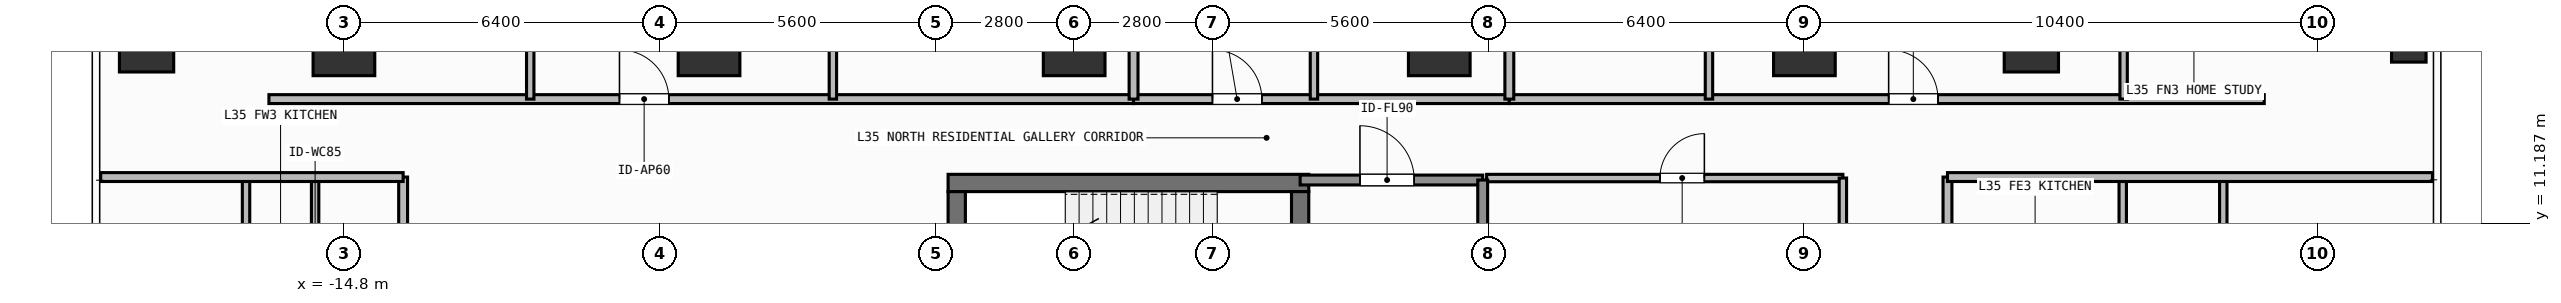
"""IFC4 building model, lengths in metres.
Left out: names, types, materials, properties, quantities, classifications, styles, units other than length and angle.
Written with IfcOpenShell. Run it as: python <this file> out.ifc"""

import sys

from ifc_helpers import new_model, si_unit, direction, frame, frame_2d, origin, origin_2d, place, context, subcontext, project, spatial, rectangle, hollow_rectangle, extrude, element, fill, save


model = new_model("IFC4")
c1 = context("Model", 3, precision=1e-05, world=origin(), true_north=direction((0.0, 1.0)))
c2 = subcontext(c1, "Body", "Model", "MODEL_VIEW")
j1 = project(units=[si_unit("LENGTHUNIT", "METRE"), si_unit("PLANEANGLEUNIT", "RADIAN")], contexts=[c1])
p1 = place(None, origin())
s1 = spatial("IfcSite", under=j1, at=p1, CompositionType="ELEMENT")
p2 = place(p1, origin())
s2 = spatial("IfcBuilding", under=s1, at=p2, CompositionType="ELEMENT")
p3 = place(p2, frame((0.0, 0.0, 140.7)))
s3 = spatial("IfcBuildingStorey", under=s2, at=p3, CompositionType="ELEMENT", Elevation=140.7)
p4 = place(p3, frame((-2.555, 12.0, 0.0), z_axis=(0.0, 0.0, 1.0), x_axis=(1.0, 0.0, 0.0)))
e1 = element("IfcWall", 1, at=p4, inside=s3, PredefinedType="SHEAR", context=c2, shape_type="SweptSolid", body=[
    extrude(rectangle(XDim=7.31, YDim=0.35, at=frame_2d((3.655, 0.0))), origin(), (0.0, 0.0, 1.0), 3.9),
])
p5 = place(p3, frame((-2.38, 8.9, 0.0), z_axis=(0.0, 0.0, 1.0), x_axis=(0.0, 1.0, 0.0)))
e2 = element("IfcWall", 2, at=p5, inside=s3, PredefinedType="SHEAR", context=c2, shape_type="SweptSolid", body=[
    extrude(rectangle(XDim=2.925, YDim=0.35, at=frame_2d((1.462, 0.0))), origin(), (0.0, 0.0, 1.0), 3.9),
])
p6 = place(p3, frame((4.58, 11.825, 0.0), z_axis=(0.0, 0.0, 1.0), x_axis=(0.0, -1.0, 0.0)))
e3 = element("IfcWall", 3, at=p6, inside=s3, PredefinedType="SHEAR", context=c2, shape_type="SweptSolid", body=[
    extrude(rectangle(XDim=2.925, YDim=0.35, at=frame_2d((1.462, 0.0))), origin(), (0.0, 0.0, 1.0), 3.9),
])
p7 = place(p6, frame((0.913, 0.0, 0.0)))
e4 = element("IfcOpeningElement", 4, at=p7, cuts=e3, PredefinedType="OPENING", context=c2, shape_type="SweptSolid", body=[
    extrude(rectangle(XDim=1.1, YDim=2.15, at=frame_2d((0.55, 1.075))), frame((0.0, 0.185, 0.0), z_axis=(0.0, -1.0, 0.0), x_axis=(1.0, 0.0, 0.0)), (0.0, 0.0, 1.0), 0.37),
])
for number, where, z_axis, x_axis in (
    (5, (-14.8, 14.8, 0.0), (0.0, 0.0, 1.0), (1.0, 0.0, 0.0)),
    (6, (-7.4, 14.8, 0.0), (0.0, 0.0, 1.0), (1.0, 0.0, 0.0)),
    (7, (0.0, 14.8, 0.0), (0.0, 0.0, 1.0), (1.0, 0.0, 0.0)),
    (8, (7.4, 14.8, 0.0), (0.0, 0.0, 1.0), (1.0, 0.0, 0.0)),
    (9, (14.8, 14.8, 0.0), (0.0, 0.0, 1.0), (1.0, 0.0, 0.0)),
):
    element("IfcColumn", number, at=place(p3, frame(where, z_axis=z_axis, x_axis=x_axis)), inside=s3, PredefinedType="COLUMN", context=c2, shape_type="SweptSolid", body=[
        extrude(rectangle(XDim=1.25, YDim=1.25, at=origin_2d()), origin(), (0.0, 0.0, 1.0), 3.9),
    ])
for number, where, z_axis, x_axis in (
    (10, (-18.8, 14.8, 0.0), (0.0, 0.0, 1.0), (1.0, 0.0, 0.0)),
    (11, (19.4, 14.8, 0.0), (0.0, 0.0, 1.0), (1.0, 0.0, 0.0)),
):
    element("IfcColumn", number, at=place(p3, frame(where, z_axis=z_axis, x_axis=x_axis)), inside=s3, PredefinedType="COLUMN", context=c2, shape_type="SweptSolid", body=[
        extrude(rectangle(XDim=1.1, YDim=1.1, at=origin_2d()), origin(), (0.0, 0.0, 1.0), 3.9),
    ])
p8 = place(p3, frame((27.05, 14.8, 0.0), z_axis=(0.0, 0.0, 1.0), x_axis=(1.0, 0.0, 0.0)))
e12 = element("IfcColumn", 12, at=p8, inside=s3, PredefinedType="COLUMN", context=c2, shape_type="SweptSolid", body=[
    extrude(hollow_rectangle(XDim=0.7, YDim=0.7, WallThickness=0.032, at=origin_2d()), origin(), (0.0, 0.0, 1.0), 3.9),
])
p9 = place(p3, frame((4.58, 12.06, 0.0), z_axis=(0.0, 0.0, 1.0), x_axis=(1.0, 0.0, 0.0)))
e13 = element("IfcWall", 13, at=p9, inside=s3, PredefinedType="SOLIDWALL", context=c2, shape_type="SweptSolid", body=[
    extrude(rectangle(XDim=3.7, YDim=0.2, at=frame_2d((1.85, 0.0))), origin(), (0.0, 0.0, 1.0), 3.68),
])
p10 = place(p9, frame((1.212, 0.0, 0.0)))
e14 = element("IfcOpeningElement", 14, at=p10, cuts=e13, PredefinedType="OPENING", context=c2, shape_type="SweptSolid", body=[
    extrude(rectangle(XDim=1.1, YDim=2.15, at=frame_2d((0.55, 1.075))), frame((0.0, 0.11, 0.0), z_axis=(0.0, -1.0, 0.0), x_axis=(1.0, 0.0, 0.0)), (0.0, 0.0, 1.0), 0.22),
])
p11 = place(p3, frame((8.36, 12.1, 0.0), z_axis=(0.0, 0.0, 1.0), x_axis=(1.0, 0.0, 0.0)))
e15 = element("IfcWall", 15, at=p11, inside=s3, PredefinedType="PARTITIONING", context=c2, shape_type="SweptSolid", body=[
    extrude(rectangle(XDim=7.22, YDim=0.15, at=frame_2d((3.61, 0.0))), origin(), (0.0, 0.0, 1.0), 3.68),
])
p12 = place(p11, frame((3.513, 0.0, 0.0)))
e16 = element("IfcOpeningElement", 16, at=p12, cuts=e15, PredefinedType="OPENING", context=c2, shape_type="SweptSolid", body=[
    extrude(rectangle(XDim=0.9, YDim=2.1, at=frame_2d((0.45, 1.05))), frame((0.0, 0.085, 0.0), z_axis=(0.0, -1.0, 0.0), x_axis=(1.0, 0.0, 0.0)), (0.0, 0.0, 1.0), 0.17),
])
p13 = place(p3, frame((-16.32, 13.7, 0.0), z_axis=(0.0, 0.0, 1.0), x_axis=(1.0, 0.0, 0.0)))
e17 = element("IfcWall", 17, at=p13, inside=s3, PredefinedType="PARTITIONING", context=c2, shape_type="SweptSolid", body=[
    extrude(rectangle(XDim=17.524, YDim=0.18, at=frame_2d((8.762, 0.0))), origin(), (0.0, 0.0, 1.0), 3.68),
])
p14 = place(p13, frame((7.104, 0.0, 0.0)))
e18 = element("IfcOpeningElement", 18, at=p14, cuts=e17, PredefinedType="OPENING", context=c2, shape_type="SweptSolid", body=[
    extrude(rectangle(XDim=1.0, YDim=2.2, at=frame_2d((0.5, 1.1))), frame((0.0, 0.1, 0.0), z_axis=(0.0, -1.0, 0.0), x_axis=(1.0, 0.0, 0.0)), (0.0, 0.0, 1.0), 0.2),
])
p15 = place(p3, frame((-11.024, 13.7, 0.0), z_axis=(0.0, 0.0, 1.0), x_axis=(0.0, 1.0, 0.0)))
e19 = element("IfcWall", 19, at=p15, inside=s3, PredefinedType="PARTITIONING", context=c2, shape_type="SweptSolid", body=[
    extrude(rectangle(XDim=5.69, YDim=0.15, at=frame_2d((2.845, 0.0))), origin(), (0.0, 0.0, 1.0), 3.68),
])
p16 = place(p15, frame((2.42, 0.0, 0.0)))
e20 = element("IfcOpeningElement", 20, at=p16, cuts=e19, PredefinedType="OPENING", context=c2, shape_type="SweptSolid", body=[
    extrude(rectangle(XDim=0.85, YDim=2.1, at=frame_2d((0.425, 1.05))), frame((0.0, 0.085, 0.0), z_axis=(0.0, -1.0, 0.0), x_axis=(1.0, 0.0, 0.0)), (0.0, 0.0, 1.0), 0.17),
])
p17 = place(p3, frame((-4.89, 13.7, 0.0), z_axis=(0.0, 0.0, 1.0), x_axis=(0.0, 1.0, 0.0)))
e21 = element("IfcWall", 21, at=p17, inside=s3, PredefinedType="PARTITIONING", context=c2, shape_type="SweptSolid", body=[
    extrude(rectangle(XDim=3.983, YDim=0.15, at=frame_2d((1.992, 0.0))), origin(), (0.0, 0.0, 1.0), 3.68),
])
p18 = place(p17, frame((1.566, 0.0, 0.0)))
e22 = element("IfcOpeningElement", 22, at=p18, cuts=e21, PredefinedType="OPENING", context=c2, shape_type="SweptSolid", body=[
    extrude(rectangle(XDim=0.85, YDim=2.1, at=frame_2d((0.425, 1.05))), frame((0.0, 0.085, 0.0), z_axis=(0.0, -1.0, 0.0), x_axis=(1.0, 0.0, 0.0)), (0.0, 0.0, 1.0), 0.17),
])
p19 = place(p3, frame((1.204, 13.7, 0.0), z_axis=(0.0, 0.0, 1.0), x_axis=(1.0, 0.0, 0.0)))
e23 = element("IfcWall", 23, at=p19, inside=s3, PredefinedType="PARTITIONING", context=c2, shape_type="SweptSolid", body=[
    extrude(rectangle(XDim=7.616, YDim=0.18, at=frame_2d((3.808, 0.0))), origin(), (0.0, 0.0, 1.0), 3.68),
])
p20 = place(p19, frame((1.599, 0.0, 0.0)))
e24 = element("IfcOpeningElement", 24, at=p20, cuts=e23, PredefinedType="OPENING", context=c2, shape_type="SweptSolid", body=[
    extrude(rectangle(XDim=1.0, YDim=2.2, at=frame_2d((0.5, 1.1))), frame((0.0, 0.1, 0.0), z_axis=(0.0, -1.0, 0.0), x_axis=(1.0, 0.0, 0.0)), (0.0, 0.0, 1.0), 0.2),
])
p21 = place(p3, frame((4.86, 13.7, 0.0), z_axis=(0.0, 0.0, 1.0), x_axis=(0.0, 1.0, 0.0)))
e25 = element("IfcWall", 25, at=p21, inside=s3, PredefinedType="PARTITIONING", context=c2, shape_type="SweptSolid", body=[
    extrude(rectangle(XDim=3.129, YDim=0.15, at=frame_2d((1.564, 0.0))), origin(), (0.0, 0.0, 1.0), 3.68),
])
p22 = place(p21, frame((1.229, 0.0, 0.0)))
e26 = element("IfcOpeningElement", 26, at=p22, cuts=e25, PredefinedType="OPENING", context=c2, shape_type="SweptSolid", body=[
    extrude(rectangle(XDim=0.85, YDim=2.1, at=frame_2d((0.425, 1.05))), frame((0.0, 0.085, 0.0), z_axis=(0.0, -1.0, 0.0), x_axis=(1.0, 0.0, 0.0)), (0.0, 0.0, 1.0), 0.17),
])
p23 = place(p3, frame((8.82, 13.7, 0.0), z_axis=(0.0, 0.0, 1.0), x_axis=(1.0, 0.0, 0.0)))
e27 = element("IfcWall", 27, at=p23, inside=s3, PredefinedType="PARTITIONING", context=c2, shape_type="SweptSolid", body=[
    extrude(rectangle(XDim=15.3, YDim=0.18, at=frame_2d((7.65, 0.0))), origin(), (0.0, 0.0, 1.0), 3.68),
])
p24 = place(p23, frame((7.688, 0.0, 0.0)))
e28 = element("IfcOpeningElement", 28, at=p24, cuts=e27, PredefinedType="OPENING", context=c2, shape_type="SweptSolid", body=[
    extrude(rectangle(XDim=1.0, YDim=2.2, at=frame_2d((0.5, 1.1))), frame((0.0, 0.1, 0.0), z_axis=(0.0, -1.0, 0.0), x_axis=(1.0, 0.0, 0.0)), (0.0, 0.0, 1.0), 0.2),
])
p25 = place(p3, frame((12.866, 13.7, 0.0), z_axis=(0.0, 0.0, 1.0), x_axis=(0.0, 1.0, 0.0)))
e29 = element("IfcWall", 29, at=p25, inside=s3, PredefinedType="PARTITIONING", context=c2, shape_type="SweptSolid", body=[
    extrude(rectangle(XDim=5.755, YDim=0.15, at=frame_2d((2.877, 0.0))), origin(), (0.0, 0.0, 1.0), 3.68),
])
p26 = place(p25, frame((2.452, 0.0, 0.0)))
e30 = element("IfcOpeningElement", 30, at=p26, cuts=e29, PredefinedType="OPENING", context=c2, shape_type="SweptSolid", body=[
    extrude(rectangle(XDim=0.85, YDim=2.1, at=frame_2d((0.425, 1.05))), frame((0.0, 0.085, 0.0), z_axis=(0.0, -1.0, 0.0), x_axis=(1.0, 0.0, 0.0)), (0.0, 0.0, 1.0), 0.17),
])
p27 = place(p3, frame((21.27, 13.7, 0.0), z_axis=(0.0, 0.0, 1.0), x_axis=(0.0, 1.0, 0.0)))
e31 = element("IfcWall", 31, at=p27, inside=s3, PredefinedType="PARTITIONING", context=c2, shape_type="SweptSolid", body=[
    extrude(rectangle(XDim=3.223, YDim=0.15, at=frame_2d((1.612, 0.0))), origin(), (0.0, 0.0, 1.0), 3.68),
])
p28 = place(p27, frame((1.7, 0.0, 0.0)))
e32 = element("IfcOpeningElement", 32, at=p28, cuts=e31, PredefinedType="OPENING", context=c2, shape_type="SweptSolid", body=[
    extrude(rectangle(XDim=0.85, YDim=2.1, at=frame_2d((0.425, 1.05))), frame((0.0, 0.085, 0.0), z_axis=(0.0, -1.0, 0.0), x_axis=(1.0, 0.0, 0.0)), (0.0, 0.0, 1.0), 0.17),
])
p29 = place(p3, frame((-13.6, 4.04, 0.0), z_axis=(0.0, 0.0, 1.0), x_axis=(0.0, 1.0, 0.0)))
e33 = element("IfcWall", 33, at=p29, inside=s3, PredefinedType="PARTITIONING", context=c2, shape_type="SweptSolid", body=[
    extrude(rectangle(XDim=8.08, YDim=0.18, at=frame_2d((4.04, 0.0))), origin(), (0.0, 0.0, 1.0), 3.68),
])
p30 = place(p29, frame((1.583, 0.0, 0.0)))
e34 = element("IfcOpeningElement", 34, at=p30, cuts=e33, PredefinedType="OPENING", context=c2, shape_type="SweptSolid", body=[
    extrude(rectangle(XDim=1.0, YDim=2.2, at=frame_2d((0.5, 1.1))), frame((0.0, 0.1, 0.0), z_axis=(0.0, -1.0, 0.0), x_axis=(1.0, 0.0, 0.0)), (0.0, 0.0, 1.0), 0.2),
])
p31 = place(p3, frame((17.7, 4.04, 0.0), z_axis=(0.0, 0.0, 1.0), x_axis=(0.0, 1.0, 0.0)))
e35 = element("IfcWall", 35, at=p31, inside=s3, PredefinedType="PARTITIONING", context=c2, shape_type="SweptSolid", body=[
    extrude(rectangle(XDim=8.08, YDim=0.18, at=frame_2d((4.04, 0.0))), origin(), (0.0, 0.0, 1.0), 3.68),
])
p32 = place(p31, frame((1.761, 0.0, 0.0)))
e36 = element("IfcOpeningElement", 36, at=p32, cuts=e35, PredefinedType="OPENING", context=c2, shape_type="SweptSolid", body=[
    extrude(rectangle(XDim=1.0, YDim=2.2, at=frame_2d((0.5, 1.1))), frame((0.0, 0.1, 0.0), z_axis=(0.0, -1.0, 0.0), x_axis=(1.0, 0.0, 0.0)), (0.0, 0.0, 1.0), 0.2),
])
p33 = place(p3, frame((8.28, 8.875, 0.0), z_axis=(0.0, 0.0, 1.0), x_axis=(0.0, 1.0, 0.0)))
e37 = element("IfcWall", 37, at=p33, inside=s3, PredefinedType="SOLIDWALL", context=c2, shape_type="SweptSolid", body=[
    extrude(rectangle(XDim=3.185, YDim=0.2, at=frame_2d((1.593, 0.0))), origin(), (0.0, 0.0, 1.0), 3.68),
])
p34 = place(p3, frame((15.58, 5.85, 0.0), z_axis=(0.0, 0.0, 1.0), x_axis=(0.0, 1.0, 0.0)))
e38 = element("IfcWall", 38, at=p34, inside=s3, PredefinedType="PARTITIONING", context=c2, shape_type="SweptSolid", body=[
    extrude(rectangle(XDim=6.25, YDim=0.15, at=frame_2d((3.125, 0.0))), origin(), (0.0, 0.0, 1.0), 3.68),
])
for number, where, z_axis, x_axis in (
    (39, (1.204, 13.7, 0.0), (0.0, 0.0, 1.0), (0.0, 1.0, 0.0)),
    (40, (8.82, 13.7, 0.0), (0.0, 0.0, 1.0), (0.0, 1.0, 0.0)),
):
    element("IfcWall", number, at=place(p3, frame(where, z_axis=z_axis, x_axis=x_axis)), inside=s3, PredefinedType="PARTITIONING", context=c2, shape_type="SweptSolid", body=[
        extrude(rectangle(XDim=9.93, YDim=0.18, at=frame_2d((4.965, 0.0))), origin(), (0.0, 0.0, 1.0), 3.68),
    ])
p35 = place(p3, frame((-15.384, 8.394, 0.0), z_axis=(0.0, 0.0, 1.0), x_axis=(0.0, 1.0, 0.0)))
e41 = element("IfcWall", 41, at=p35, inside=s3, PredefinedType="PARTITIONING", context=c2, shape_type="SweptSolid", body=[
    extrude(rectangle(XDim=3.726, YDim=0.15, at=frame_2d((1.863, 0.0))), origin(), (0.0, 0.0, 1.0), 3.68),
])
p36 = place(p35, frame((1.353, 0.0, 0.0)))
e42 = element("IfcOpeningElement", 42, at=p36, cuts=e41, PredefinedType="OPENING", context=c2, shape_type="SweptSolid", body=[
    extrude(rectangle(XDim=0.85, YDim=2.1, at=frame_2d((0.425, 1.05))), frame((0.0, 0.085, 0.0), z_axis=(0.0, -1.0, 0.0), x_axis=(1.0, 0.0, 0.0)), (0.0, 0.0, 1.0), 0.17),
])
p37 = place(p3, frame((-16.784, 8.394, 0.0), z_axis=(0.0, 0.0, 1.0), x_axis=(0.0, 1.0, 0.0)))
e43 = element("IfcWall", 43, at=p37, inside=s3, PredefinedType="PARTITIONING", context=c2, shape_type="SweptSolid", body=[
    extrude(rectangle(XDim=3.726, YDim=0.15, at=frame_2d((1.863, 0.0))), origin(), (0.0, 0.0, 1.0), 3.68),
])
p38 = place(p3, frame((-19.73, 12.12, 0.0), z_axis=(0.0, 0.0, 1.0), x_axis=(1.0, 0.0, 0.0)))
e44 = element("IfcWall", 44, at=p38, inside=s3, PredefinedType="PARTITIONING", context=c2, shape_type="SweptSolid", body=[
    extrude(rectangle(XDim=6.13, YDim=0.18, at=frame_2d((3.065, 0.0))), origin(), (0.0, 0.0, 1.0), 3.68),
])
for number, where, z_axis, x_axis in (
    (45, (21.252, 9.32, 0.0), (0.0, 0.0, 1.0), (0.0, 1.0, 0.0)),
    (46, (23.29, 9.32, 0.0), (0.0, 0.0, 1.0), (0.0, 1.0, 0.0)),
):
    element("IfcWall", number, at=place(p3, frame(where, z_axis=z_axis, x_axis=x_axis)), inside=s3, PredefinedType="PARTITIONING", context=c2, shape_type="SweptSolid", body=[
        extrude(rectangle(XDim=2.8, YDim=0.15, at=frame_2d((1.4, 0.0))), origin(), (0.0, 0.0, 1.0), 3.68),
    ])
p39 = place(p3, frame((17.7, 12.12, 0.0), z_axis=(0.0, 0.0, 1.0), x_axis=(1.0, 0.0, 0.0)))
e47 = element("IfcWall", 47, at=p39, inside=s3, PredefinedType="PARTITIONING", context=c2, shape_type="SweptSolid", body=[
    extrude(rectangle(XDim=9.83, YDim=0.18, at=frame_2d((4.915, 0.0))), origin(), (0.0, 0.0, 1.0), 3.68),
])
p40 = place(p10, origin())
e48 = element("IfcDoor", 48, at=p40, inside=s3, OperationType="SINGLE_SWING_LEFT", PredefinedType="DOOR", context=c2, shape_type="SweptSolid", body=[
    extrude(rectangle(XDim=1.1, YDim=2.15, at=frame_2d((0.55, 1.075))), frame((0.0, 0.025, 0.0), z_axis=(0.0, -1.0, 0.0), x_axis=(1.0, 0.0, 0.0)), (0.0, 0.0, 1.0), 0.05),
])
fill(e14, e48)
p41 = place(p12, origin())
e49 = element("IfcDoor", 49, at=p41, inside=s3, OperationType="SINGLE_SWING_RIGHT", PredefinedType="DOOR", context=c2, shape_type="SweptSolid", body=[
    extrude(rectangle(XDim=0.9, YDim=2.1, at=frame_2d((0.45, 1.05))), frame((0.0, 0.025, 0.0), z_axis=(0.0, -1.0, 0.0), x_axis=(1.0, 0.0, 0.0)), (0.0, 0.0, 1.0), 0.05),
])
fill(e16, e49)
p42 = place(p14, origin())
e50 = element("IfcDoor", 50, at=p42, inside=s3, OperationType="SINGLE_SWING_LEFT", PredefinedType="DOOR", context=c2, shape_type="SweptSolid", body=[
    extrude(rectangle(XDim=1.0, YDim=2.2, at=frame_2d((0.5, 1.1))), frame((0.0, 0.025, 0.0), z_axis=(0.0, -1.0, 0.0), x_axis=(1.0, 0.0, 0.0)), (0.0, 0.0, 1.0), 0.05),
])
fill(e18, e50)
p43 = place(p20, origin())
e51 = element("IfcDoor", 51, at=p43, inside=s3, OperationType="SINGLE_SWING_LEFT", PredefinedType="DOOR", context=c2, shape_type="SweptSolid", body=[
    extrude(rectangle(XDim=1.0, YDim=2.2, at=frame_2d((0.5, 1.1))), frame((0.0, 0.025, 0.0), z_axis=(0.0, -1.0, 0.0), x_axis=(1.0, 0.0, 0.0)), (0.0, 0.0, 1.0), 0.05),
])
fill(e24, e51)
p44 = place(p24, origin())
e52 = element("IfcDoor", 52, at=p44, inside=s3, OperationType="SINGLE_SWING_LEFT", PredefinedType="DOOR", context=c2, shape_type="SweptSolid", body=[
    extrude(rectangle(XDim=1.0, YDim=2.2, at=frame_2d((0.5, 1.1))), frame((0.0, 0.025, 0.0), z_axis=(0.0, -1.0, 0.0), x_axis=(1.0, 0.0, 0.0)), (0.0, 0.0, 1.0), 0.05),
])
fill(e28, e52)
save(model, sys.argv[1])
